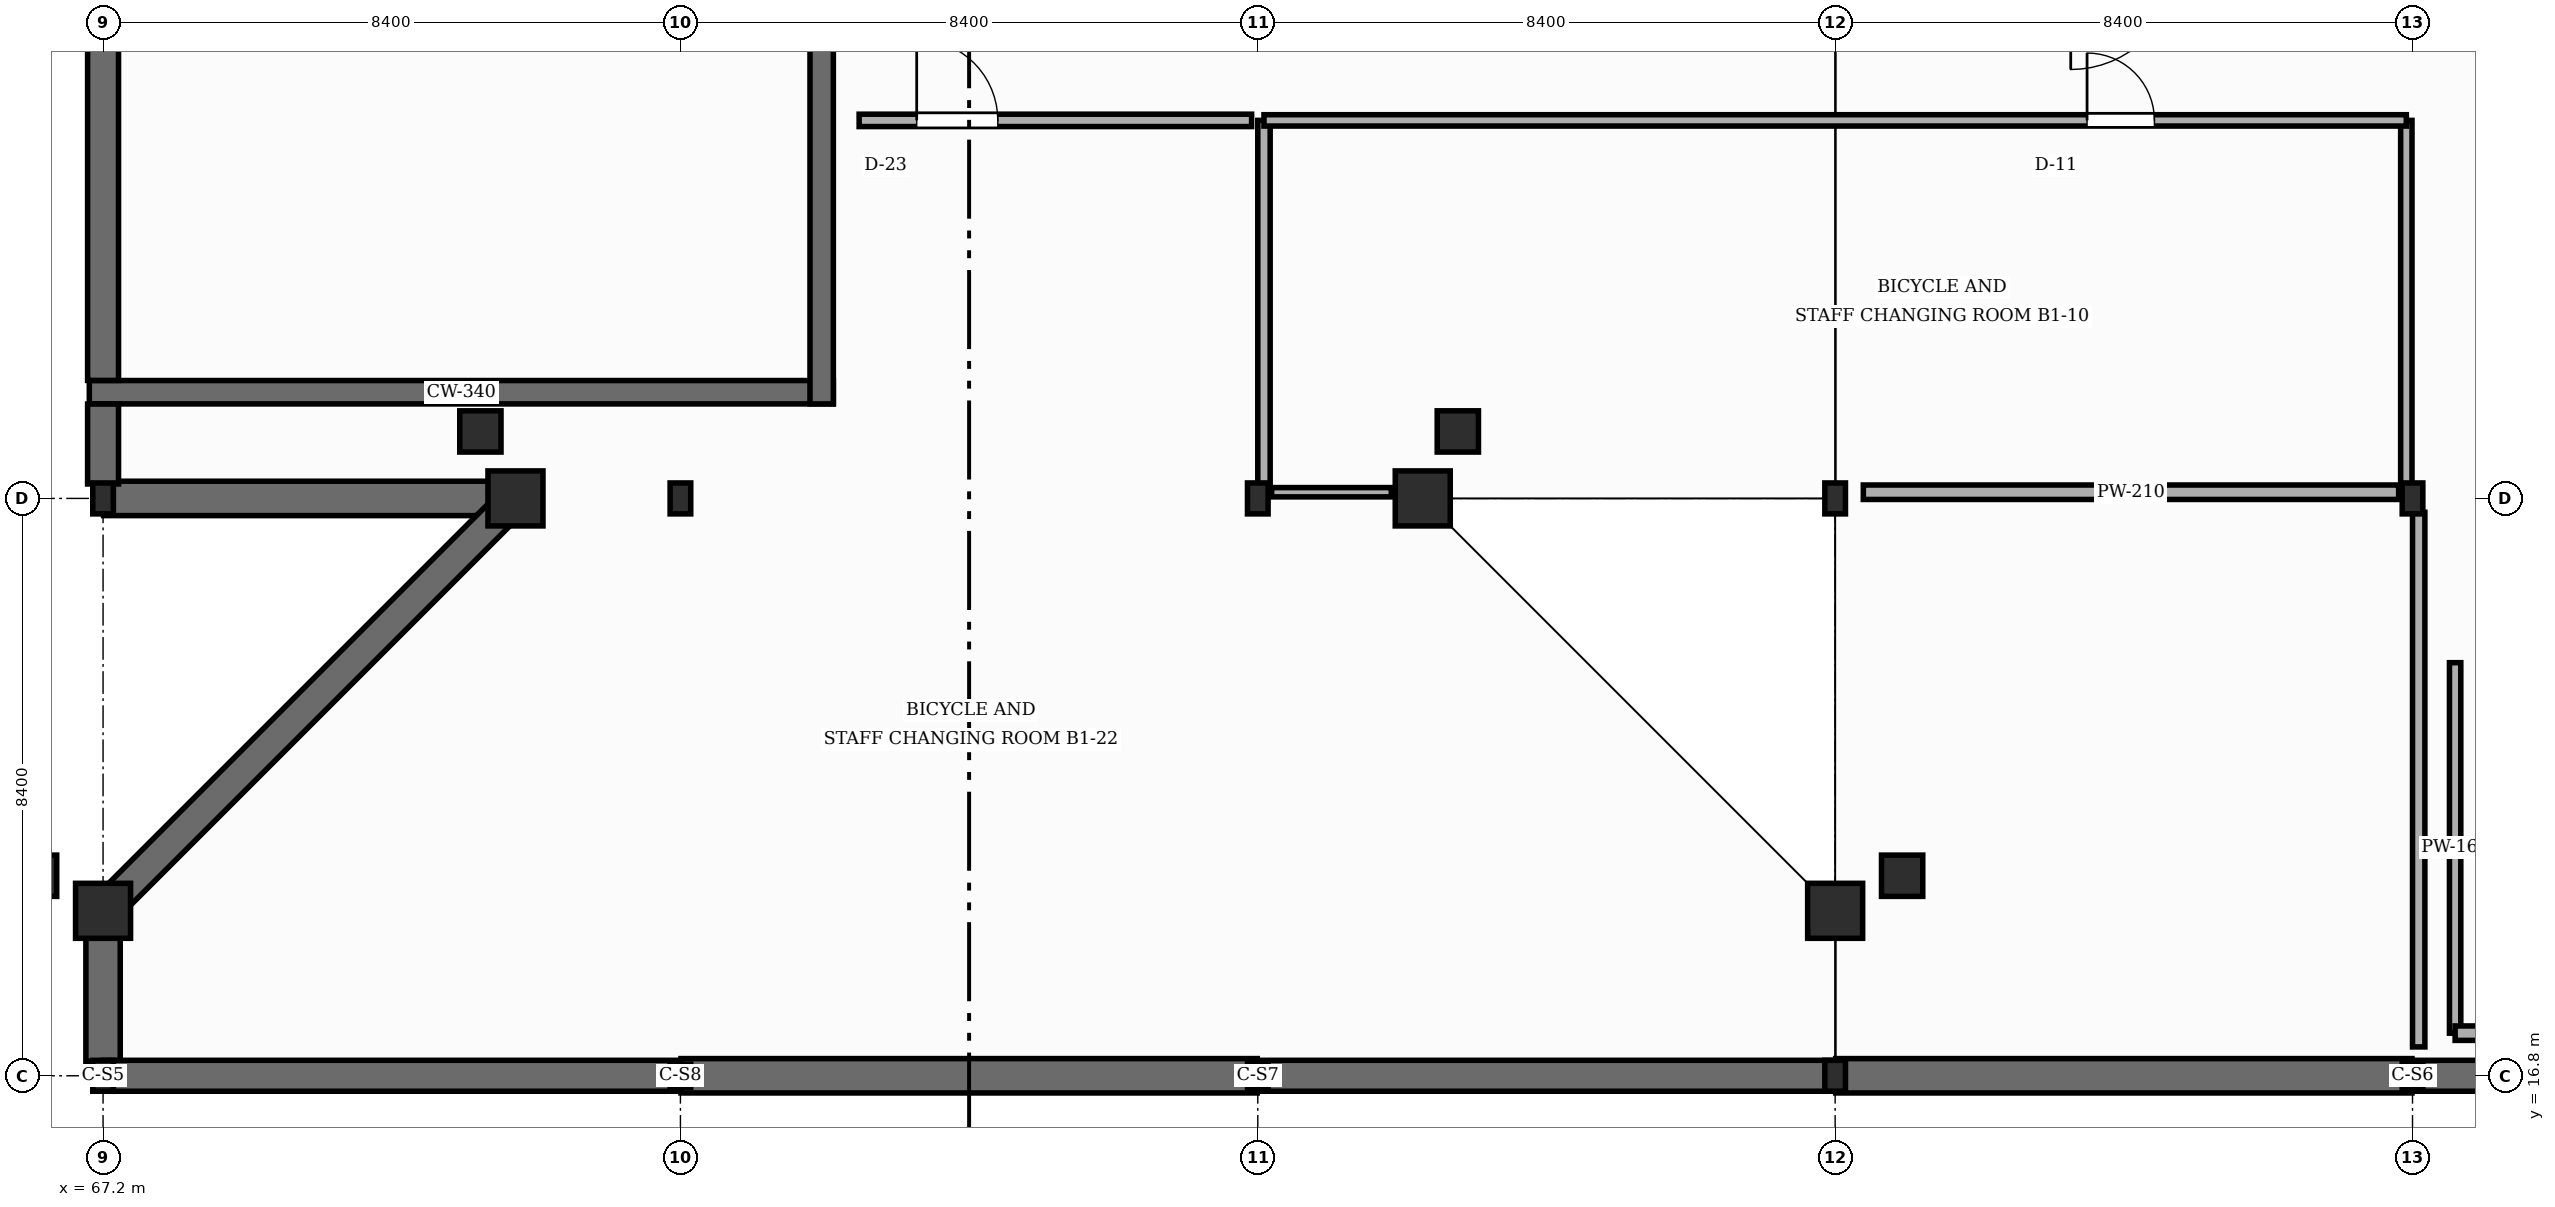
"""IFC4 building model, lengths in metres.
Left out: names, types, materials, properties, quantities, classifications, styles, units other than length and angle.
Written with IfcOpenShell. Run it as: python <this file> out.ifc"""

import sys

from ifc_helpers import new_model, si_unit, direction, frame, frame_2d, origin, origin_2d, place, context, subcontext, project, spatial, rectangle, i_section, extrude, element, fill, save


model = new_model("IFC4")
c1 = context("Model", 3, precision=1e-05, world=origin(), true_north=direction((0.0, 1.0)))
c2 = subcontext(c1, "Body", "Model", "MODEL_VIEW")
j1 = project(units=[si_unit("LENGTHUNIT", "METRE"), si_unit("PLANEANGLEUNIT", "RADIAN")], contexts=[c1])
p1 = place(None, origin())
s1 = spatial("IfcSite", under=j1, at=p1, CompositionType="ELEMENT")
p2 = place(p1, origin())
s2 = spatial("IfcBuilding", under=s1, at=p2, CompositionType="ELEMENT")
p3 = place(p2, frame((0.0, 0.0, -4.5)))
s3 = spatial("IfcBuildingStorey", under=s2, at=p3, CompositionType="ELEMENT", Elevation=-4.5)
for number, where, z_axis, x_axis in (
    (1, (67.2, 16.8, 0.0), (0.0, 0.0, 1.0), (1.0, 0.0, 0.0)),
    (2, (67.2, 25.2, 0.0), (0.0, 0.0, 1.0), (1.0, 0.0, 0.0)),
):
    element("IfcColumn", number, at=place(p3, frame(where, z_axis=z_axis, x_axis=x_axis)), inside=s3, PredefinedType="COLUMN", context=c2, shape_type="SweptSolid", body=[
        extrude(i_section(OverallWidth=0.3, OverallDepth=0.45, WebThickness=0.014, FlangeThickness=0.026, FilletRadius=0.027, at=origin_2d()), origin(), (0.0, 0.0, 1.0), 4.5),
    ])
p4 = place(p3, frame((75.6, 16.8, 0.0), z_axis=(0.0, 0.0, 1.0), x_axis=(1.0, 0.0, 0.0)))
e3 = element("IfcColumn", 3, at=p4, inside=s3, PredefinedType="COLUMN", context=c2, shape_type="SweptSolid", body=[
    extrude(i_section(OverallWidth=0.3, OverallDepth=0.34, WebThickness=0.012, FlangeThickness=0.021, FilletRadius=0.027, at=origin_2d()), origin(), (0.0, 0.0, 1.0), 4.5),
])
p5 = place(p3, frame((75.6, 25.2, 0.0), z_axis=(0.0, 0.0, 1.0), x_axis=(1.0, 0.0, 0.0)))
e4 = element("IfcColumn", 4, at=p5, inside=s3, PredefinedType="COLUMN", context=c2, shape_type="SweptSolid", body=[
    extrude(i_section(OverallWidth=0.3, OverallDepth=0.45, WebThickness=0.014, FlangeThickness=0.026, FilletRadius=0.027, at=origin_2d()), origin(), (0.0, 0.0, 1.0), 4.5),
])
p6 = place(p3, frame((84.0, 16.8, 0.0), z_axis=(0.0, 0.0, 1.0), x_axis=(1.0, 0.0, 0.0)))
e5 = element("IfcColumn", 5, at=p6, inside=s3, PredefinedType="COLUMN", context=c2, shape_type="SweptSolid", body=[
    extrude(i_section(OverallWidth=0.3, OverallDepth=0.36, WebThickness=0.012, FlangeThickness=0.022, FilletRadius=0.027, at=origin_2d()), origin(), (0.0, 0.0, 1.0), 4.5),
])
for number, where, z_axis, x_axis in (
    (6, (84.0, 25.2, 0.0), (0.0, 0.0, 1.0), (1.0, 0.0, 0.0)),
    (7, (92.4, 16.8, 0.0), (0.0, 0.0, 1.0), (1.0, 0.0, 0.0)),
    (8, (92.4, 25.2, 0.0), (0.0, 0.0, 1.0), (1.0, 0.0, 0.0)),
):
    element("IfcColumn", number, at=place(p3, frame(where, z_axis=z_axis, x_axis=x_axis)), inside=s3, PredefinedType="COLUMN", context=c2, shape_type="SweptSolid", body=[
        extrude(i_section(OverallWidth=0.3, OverallDepth=0.45, WebThickness=0.014, FlangeThickness=0.026, FilletRadius=0.027, at=origin_2d()), origin(), (0.0, 0.0, 1.0), 4.5),
    ])
p7 = place(p3, frame((100.8, 16.8, 0.0), z_axis=(0.0, 0.0, 1.0), x_axis=(1.0, 0.0, 0.0)))
e9 = element("IfcColumn", 9, at=p7, inside=s3, PredefinedType="COLUMN", context=c2, shape_type="SweptSolid", body=[
    extrude(i_section(OverallWidth=0.3, OverallDepth=0.4, WebThickness=0.013, FlangeThickness=0.024, FilletRadius=0.027, at=origin_2d()), origin(), (0.0, 0.0, 1.0), 4.5),
])
p8 = place(p3, frame((100.8, 25.2, 0.0), z_axis=(0.0, 0.0, 1.0), x_axis=(1.0, 0.0, 0.0)))
e10 = element("IfcColumn", 10, at=p8, inside=s3, PredefinedType="COLUMN", context=c2, shape_type="SweptSolid", body=[
    extrude(i_section(OverallWidth=0.3, OverallDepth=0.45, WebThickness=0.014, FlangeThickness=0.026, FilletRadius=0.027, at=origin_2d()), origin(), (0.0, 0.0, 1.0), 4.5),
])
p9 = place(p3, frame((92.4, 19.2, 0.0), z_axis=(0.0, 0.0, 1.0), x_axis=(1.0, 0.0, 0.0)))
e11 = element("IfcColumn", 11, at=p9, inside=s3, PredefinedType="COLUMN", context=c2, shape_type="SweptSolid", body=[
    extrude(rectangle(XDim=0.8, YDim=0.8, at=origin_2d()), origin(), (0.0, 0.0, 1.0), 4.5),
])
p10 = place(p3, frame((93.375, 19.71, 0.0), z_axis=(0.0, 0.0, 1.0), x_axis=(1.0, 0.0, 0.0)))
e12 = element("IfcColumn", 12, at=p10, inside=s3, PredefinedType="COLUMN", context=c2, shape_type="SweptSolid", body=[
    extrude(rectangle(XDim=0.6, YDim=0.6, at=origin_2d()), origin(), (0.0, 0.0, 1.0), 4.5),
])
p11 = place(p3, frame((86.4, 25.2, 0.0), z_axis=(0.0, 0.0, 1.0), x_axis=(1.0, 0.0, 0.0)))
e13 = element("IfcColumn", 13, at=p11, inside=s3, PredefinedType="COLUMN", context=c2, shape_type="SweptSolid", body=[
    extrude(rectangle(XDim=0.8, YDim=0.8, at=origin_2d()), origin(), (0.0, 0.0, 1.0), 4.5),
])
p12 = place(p3, frame((86.91, 26.174, 0.0), z_axis=(0.0, 0.0, 1.0), x_axis=(1.0, 0.0, 0.0)))
e14 = element("IfcColumn", 14, at=p12, inside=s3, PredefinedType="COLUMN", context=c2, shape_type="SweptSolid", body=[
    extrude(rectangle(XDim=0.6, YDim=0.6, at=origin_2d()), origin(), (0.0, 0.0, 1.0), 4.5),
])
p13 = place(p3, frame((73.2, 25.2, 0.0), z_axis=(0.0, 0.0, 1.0), x_axis=(1.0, 0.0, 0.0)))
e15 = element("IfcColumn", 15, at=p13, inside=s3, PredefinedType="COLUMN", context=c2, shape_type="SweptSolid", body=[
    extrude(rectangle(XDim=0.8, YDim=0.8, at=origin_2d()), origin(), (0.0, 0.0, 1.0), 4.5),
])
p14 = place(p3, frame((72.69, 26.174, 0.0), z_axis=(0.0, 0.0, 1.0), x_axis=(1.0, 0.0, 0.0)))
e16 = element("IfcColumn", 16, at=p14, inside=s3, PredefinedType="COLUMN", context=c2, shape_type="SweptSolid", body=[
    extrude(rectangle(XDim=0.6, YDim=0.6, at=origin_2d()), origin(), (0.0, 0.0, 1.0), 4.5),
])
p15 = place(p3, frame((67.2, 19.2, 0.0), z_axis=(0.0, 0.0, 1.0), x_axis=(1.0, 0.0, 0.0)))
e17 = element("IfcColumn", 17, at=p15, inside=s3, PredefinedType="COLUMN", context=c2, shape_type="SweptSolid", body=[
    extrude(rectangle(XDim=0.8, YDim=0.8, at=origin_2d()), origin(), (0.0, 0.0, 1.0), 4.5),
])
p16 = place(p3, frame((66.226, 19.71, 0.0), z_axis=(0.0, 0.0, 1.0), x_axis=(1.0, 0.0, 0.0)))
e18 = element("IfcColumn", 18, at=p16, inside=s3, PredefinedType="COLUMN", context=c2, shape_type="SweptSolid", body=[
    extrude(rectangle(XDim=0.6, YDim=0.6, at=origin_2d()), origin(), (0.0, 0.0, 1.0), 4.5),
])
p17 = place(p3, frame((67.208, 25.2, 0.0), z_axis=(0.0, 0.0, 1.0), x_axis=(1.0, 0.0, 0.0)))
e19 = element("IfcWall", 19, at=p17, inside=s3, PredefinedType="USERDEFINED", context=c2, shape_type="SweptSolid", body=[
    extrude(rectangle(XDim=5.607, YDim=0.5, at=frame_2d((2.803, 0.0))), origin(), (0.0, 0.0, 1.0), 4.25),
])
p18 = place(p3, frame((72.95, 24.95, 0.0), z_axis=(0.0, 0.0, 1.0), x_axis=(-0.707106781187, -0.707106781187, 0.0)))
e20 = element("IfcWall", 20, at=p18, inside=s3, PredefinedType="USERDEFINED", context=c2, shape_type="SweptSolid", body=[
    extrude(rectangle(XDim=7.779, YDim=0.45, at=frame_2d((3.89, 0.0))), origin(), (0.0, 0.0, 1.0), 4.25),
])
p19 = place(p3, frame((67.2, 18.815, 0.0), z_axis=(0.0, 0.0, 1.0), x_axis=(0.0, -1.0, 0.0)))
e21 = element("IfcWall", 21, at=p19, inside=s3, PredefinedType="USERDEFINED", context=c2, shape_type="SweptSolid", body=[
    extrude(rectangle(XDim=1.805, YDim=0.5, at=frame_2d((0.902, 0.0))), origin(), (0.0, 0.0, 1.0), 4.25),
])
p20 = place(p3, frame((67.208, 16.8, 0.0), z_axis=(0.0, 0.0, 1.0), x_axis=(1.0, 0.0, 0.0)))
e22 = element("IfcWall", 22, at=p20, inside=s3, PredefinedType="USERDEFINED", context=c2, shape_type="SweptSolid", body=[
    extrude(rectangle(XDim=8.384, YDim=0.45, at=frame_2d((4.192, 0.0))), origin(), (0.0, 0.0, 1.0), 4.25),
])
p21 = place(p3, frame((75.608, 16.8, 0.0), z_axis=(0.0, 0.0, 1.0), x_axis=(1.0, 0.0, 0.0)))
e23 = element("IfcWall", 23, at=p21, inside=s3, PredefinedType="USERDEFINED", context=c2, shape_type="SweptSolid", body=[
    extrude(rectangle(XDim=8.384, YDim=0.5, at=frame_2d((4.192, 0.0))), origin(), (0.0, 0.0, 1.0), 4.25),
])
p22 = place(p3, frame((84.008, 16.8, 0.0), z_axis=(0.0, 0.0, 1.0), x_axis=(1.0, 0.0, 0.0)))
e24 = element("IfcWall", 24, at=p22, inside=s3, PredefinedType="USERDEFINED", context=c2, shape_type="SweptSolid", body=[
    extrude(rectangle(XDim=8.384, YDim=0.45, at=frame_2d((4.192, 0.0))), origin(), (0.0, 0.0, 1.0), 4.25),
])
p23 = place(p3, frame((92.408, 16.8, 0.0), z_axis=(0.0, 0.0, 1.0), x_axis=(1.0, 0.0, 0.0)))
e25 = element("IfcWall", 25, at=p23, inside=s3, PredefinedType="USERDEFINED", context=c2, shape_type="SweptSolid", body=[
    extrude(rectangle(XDim=8.384, YDim=0.5, at=frame_2d((4.192, 0.0))), origin(), (0.0, 0.0, 1.0), 4.25),
])
p24 = place(p3, frame((100.808, 16.8, 0.0), z_axis=(0.0, 0.0, 1.0), x_axis=(1.0, 0.0, 0.0)))
e26 = element("IfcWall", 26, at=p24, inside=s3, PredefinedType="USERDEFINED", context=c2, shape_type="SweptSolid", body=[
    extrude(rectangle(XDim=8.384, YDim=0.45, at=frame_2d((4.192, 0.0))), origin(), (0.0, 0.0, 1.0), 4.25),
])
p25 = place(p3, frame((67.0, 26.745, 0.0), z_axis=(0.0, 0.0, 1.0), x_axis=(1.0, 0.0, 0.0)))
e27 = element("IfcWall", 27, at=p25, inside=s3, PredefinedType="SHEAR", context=c2, shape_type="SweptSolid", body=[
    extrude(rectangle(XDim=10.825, YDim=0.34, at=frame_2d((5.413, 0.0))), origin(), (0.0, 0.0, 1.0), 4.25),
])
p26 = place(p3, frame((77.655, 26.575, 0.0), z_axis=(0.0, 0.0, 1.0), x_axis=(0.0, 1.0, 0.0)))
e28 = element("IfcWall", 28, at=p26, inside=s3, PredefinedType="SHEAR", context=c2, shape_type="SweptSolid", body=[
    extrude(rectangle(XDim=5.65, YDim=0.34, at=frame_2d((2.825, 0.0))), origin(), (0.0, 0.0, 1.0), 4.25),
])
p27 = place(p3, frame((101.42, 22.81, -0.004), z_axis=(0.0, 0.0, 1.0), x_axis=(0.0, -1.0, 0.0)))
e29 = element("IfcWall", 29, at=p27, inside=s3, PredefinedType="STANDARD", context=c2, shape_type="SweptSolid", body=[
    extrude(rectangle(XDim=5.39, YDim=0.165, at=frame_2d((2.695, 0.0))), origin(), (0.0, 0.0, 1.0), 4.254),
])
p28 = place(p3, frame((101.42, 17.42, -0.004), z_axis=(0.0, 0.0, 1.0), x_axis=(1.0, 0.0, 0.0)))
e30 = element("IfcWall", 30, at=p28, inside=s3, PredefinedType="STANDARD", context=c2, shape_type="SweptSolid", body=[
    extrude(rectangle(XDim=2.28, YDim=0.21, at=frame_2d((1.14, 0.0))), origin(), (0.0, 0.0, 1.0), 4.254),
])
p29 = place(p3, frame((100.89, 17.22, -0.004), z_axis=(0.0, 0.0, 1.0), x_axis=(0.0, 1.0, 0.0)))
e31 = element("IfcWall", 31, at=p29, inside=s3, PredefinedType="STANDARD", context=c2, shape_type="SweptSolid", body=[
    extrude(rectangle(XDim=7.778, YDim=0.18, at=frame_2d((3.889, 0.0))), origin(), (0.0, 0.0, 1.0), 3.636),
])
p30 = place(p3, frame((100.71, 30.7, -0.004), z_axis=(0.0, 0.0, 1.0), x_axis=(0.0, -1.0, 0.0)))
e32 = element("IfcWall", 32, at=p30, inside=s3, PredefinedType="STANDARD", context=c2, shape_type="SweptSolid", body=[
    extrude(rectangle(XDim=5.298, YDim=0.165, at=frame_2d((2.649, 0.0))), origin(), (0.0, 0.0, 1.0), 3.746),
])
p31 = place(p3, frame((100.598, 25.29, -0.004), z_axis=(0.0, 0.0, 1.0), x_axis=(-1.0, 0.0, 0.0)))
e33 = element("IfcWall", 33, at=p31, inside=s3, PredefinedType="STANDARD", context=c2, shape_type="SweptSolid", body=[
    extrude(rectangle(XDim=7.789, YDim=0.21, at=frame_2d((3.894, 0.0))), origin(), (0.0, 0.0, 1.0), 3.686),
])
p32 = place(p3, frame((85.942, 25.29, -0.004), z_axis=(0.0, 0.0, 1.0), x_axis=(-1.0, 0.0, 0.0)))
e34 = element("IfcWall", 34, at=p32, inside=s3, PredefinedType="STANDARD", context=c2, shape_type="SweptSolid", body=[
    extrude(rectangle(XDim=1.741, YDim=0.135, at=frame_2d((0.87, 0.0))), origin(), (0.0, 0.0, 1.0), 3.846),
])
p33 = place(p3, frame((84.09, 25.402, -0.004), z_axis=(0.0, 0.0, 1.0), x_axis=(0.0, 1.0, 0.0)))
e35 = element("IfcWall", 35, at=p33, inside=s3, PredefinedType="STANDARD", context=c2, shape_type="SweptSolid", body=[
    extrude(rectangle(XDim=5.298, YDim=0.18, at=frame_2d((2.649, 0.0))), origin(), (0.0, 0.0, 1.0), 3.926),
])
p34 = place(p3, frame((84.09, 30.7, -0.004), z_axis=(0.0, 0.0, 1.0), x_axis=(1.0, 0.0, 0.0)))
e36 = element("IfcWall", 36, at=p34, inside=s3, PredefinedType="STANDARD", context=c2, shape_type="SweptSolid", body=[
    extrude(rectangle(XDim=16.62, YDim=0.165, at=frame_2d((8.31, 0.0))), origin(), (0.0, 0.0, 1.0), 4.254),
])
p35 = place(p34, frame((11.975, 0.0, 0.015)))
e37 = element("IfcOpeningElement", 37, at=p35, cuts=e36, PredefinedType="OPENING", context=c2, shape_type="SweptSolid", body=[
    extrude(rectangle(XDim=0.98, YDim=2.14, at=frame_2d((0.49, 1.07))), frame((0.0, 0.093, 0.0), z_axis=(0.0, -1.0, 0.0), x_axis=(1.0, 0.0, 0.0)), (0.0, 0.0, 1.0), 0.185),
])
p36 = place(p3, frame((78.2, 30.7, -0.004), z_axis=(0.0, 0.0, 1.0), x_axis=(1.0, 0.0, 0.0)))
e38 = element("IfcWall", 38, at=p36, inside=s3, PredefinedType="STANDARD", context=c2, shape_type="SweptSolid", body=[
    extrude(rectangle(XDim=5.71, YDim=0.18, at=frame_2d((2.855, 0.0))), origin(), (0.0, 0.0, 1.0), 4.254),
])
p37 = place(p36, frame((0.837, 0.0, 0.015)))
e39 = element("IfcOpeningElement", 39, at=p37, cuts=e38, PredefinedType="OPENING", context=c2, shape_type="SweptSolid", body=[
    extrude(rectangle(XDim=1.18, YDim=2.22, at=frame_2d((0.59, 1.11))), frame((0.0, 0.1, 0.0), z_axis=(0.0, -1.0, 0.0), x_axis=(1.0, 0.0, 0.0)), (0.0, 0.0, 1.0), 0.2),
])
p38 = place(p3, frame((67.2, 31.883, 0.0), z_axis=(0.0, 0.0, 1.0), x_axis=(0.0, -1.0, 0.0)))
e40 = element("IfcWall", 40, at=p38, inside=s3, PredefinedType="USERDEFINED", context=c2, shape_type="SweptSolid", body=[
    extrude(rectangle(XDim=4.966, YDim=0.45, at=frame_2d((2.483, 0.0))), origin(), (0.0, 0.0, 1.0), 4.25),
])
p39 = place(p3, frame((67.2, 26.573, 0.0), z_axis=(0.0, 0.0, 1.0), x_axis=(0.0, -1.0, 0.0)))
e41 = element("IfcWall", 41, at=p39, inside=s3, PredefinedType="USERDEFINED", context=c2, shape_type="SweptSolid", body=[
    extrude(rectangle(XDim=1.163, YDim=0.45, at=frame_2d((0.582, 0.0))), origin(), (0.0, 0.0, 1.0), 4.25),
])
p40 = place(p35, origin())
e42 = element("IfcDoor", 42, at=p40, inside=s3, OperationType="SINGLE_SWING_LEFT", PredefinedType="DOOR", context=c2, shape_type="SweptSolid", body=[
    extrude(rectangle(XDim=0.98, YDim=2.14, at=frame_2d((0.49, 1.07))), frame((0.0, 0.025, 0.0), z_axis=(0.0, -1.0, 0.0), x_axis=(1.0, 0.0, 0.0)), (0.0, 0.0, 1.0), 0.05),
])
fill(e37, e42)
p41 = place(p37, origin())
e43 = element("IfcDoor", 43, at=p41, inside=s3, OperationType="SINGLE_SWING_LEFT", PredefinedType="DOOR", context=c2, shape_type="SweptSolid", body=[
    extrude(rectangle(XDim=1.18, YDim=2.22, at=frame_2d((0.59, 1.11))), frame((0.0, 0.025, 0.0), z_axis=(0.0, -1.0, 0.0), x_axis=(1.0, 0.0, 0.0)), (0.0, 0.0, 1.0), 0.05),
])
fill(e39, e43)
save(model, sys.argv[1])
